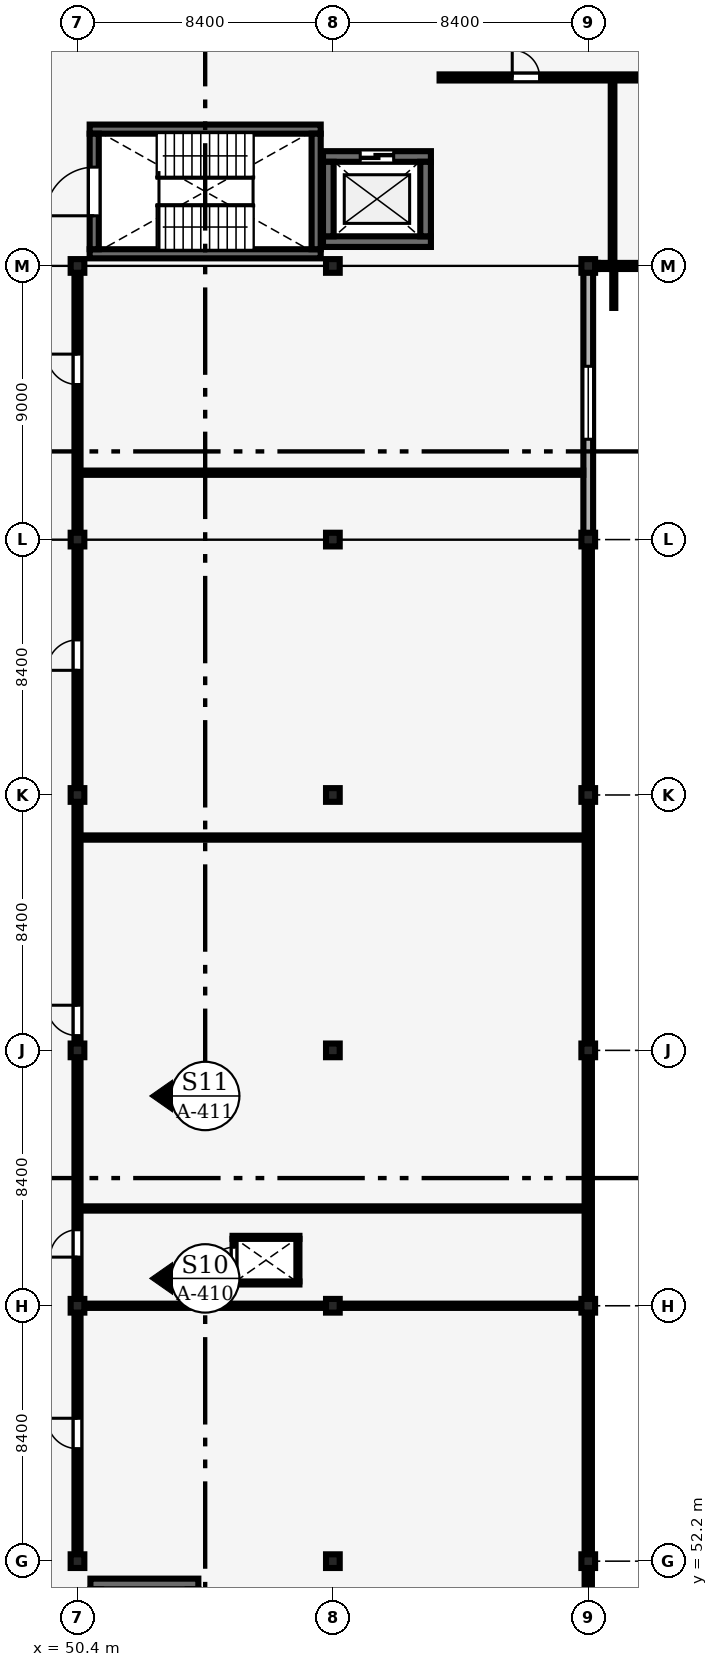
"""IFC4 building model, lengths in metres.
Left out: names, types, materials, properties, quantities, classifications, styles, units other than length and angle.
Written with IfcOpenShell. Run it as: python <this file> out.ifc"""

import sys

from ifc_helpers import new_model, si_unit, direction, frame, frame_2d, origin, origin_2d, place, context, subcontext, project, spatial, rectangle, extrude, element, fill, save


model = new_model("IFC4")
c1 = context("Model", 3, precision=1e-05, world=origin(), true_north=direction((0.0, 1.0)))
c2 = subcontext(c1, "Body", "Model", "MODEL_VIEW")
j1 = project(units=[si_unit("LENGTHUNIT", "METRE"), si_unit("PLANEANGLEUNIT", "RADIAN")], contexts=[c1])
p1 = place(None, origin())
s1 = spatial("IfcSite", under=j1, at=p1, CompositionType="ELEMENT")
p2 = place(p1, origin())
s2 = spatial("IfcBuilding", under=s1, at=p2, CompositionType="ELEMENT")
p3 = place(p2, frame((0.0, 0.0, 17.4)))
s3 = spatial("IfcBuildingStorey", under=s2, at=p3, CompositionType="ELEMENT", Elevation=17.4)
for number, where, z_axis, x_axis in (
    (1, (50.4, 52.2, 0.0), (0.0, 0.0, 1.0), (1.0, 0.0, 0.0)),
    (2, (50.4, 60.6, 0.0), (0.0, 0.0, 1.0), (1.0, 0.0, 0.0)),
    (3, (50.4, 69.0, 0.0), (0.0, 0.0, 1.0), (1.0, 0.0, 0.0)),
    (4, (50.4, 77.4, 0.0), (0.0, 0.0, 1.0), (1.0, 0.0, 0.0)),
    (5, (50.4, 85.8, 0.0), (0.0, 0.0, 1.0), (1.0, 0.0, 0.0)),
    (6, (50.4, 94.8, 0.0), (0.0, 0.0, 1.0), (1.0, 0.0, 0.0)),
    (7, (58.8, 52.2, 0.0), (0.0, 0.0, 1.0), (1.0, 0.0, 0.0)),
    (8, (58.8, 60.6, 0.0), (0.0, 0.0, 1.0), (1.0, 0.0, 0.0)),
    (9, (58.8, 69.0, 0.0), (0.0, 0.0, 1.0), (1.0, 0.0, 0.0)),
    (10, (58.8, 77.4, 0.0), (0.0, 0.0, 1.0), (1.0, 0.0, 0.0)),
    (11, (58.8, 85.8, 0.0), (0.0, 0.0, 1.0), (1.0, 0.0, 0.0)),
    (12, (58.8, 94.8, 0.0), (0.0, 0.0, 1.0), (1.0, 0.0, 0.0)),
    (13, (67.2, 52.2, 0.0), (0.0, 0.0, 1.0), (1.0, 0.0, 0.0)),
    (14, (67.2, 60.6, 0.0), (0.0, 0.0, 1.0), (1.0, 0.0, 0.0)),
    (15, (67.2, 69.0, 0.0), (0.0, 0.0, 1.0), (1.0, 0.0, 0.0)),
    (16, (67.2, 77.4, 0.0), (0.0, 0.0, 1.0), (1.0, 0.0, 0.0)),
    (17, (67.2, 85.8, 0.0), (0.0, 0.0, 1.0), (1.0, 0.0, 0.0)),
    (18, (67.2, 94.8, 0.0), (0.0, 0.0, 1.0), (1.0, 0.0, 0.0)),
):
    element("IfcColumn", number, at=place(p3, frame(where, z_axis=z_axis, x_axis=x_axis)), inside=s3, PredefinedType="COLUMN", context=c2, shape_type="SweptSolid", body=[
        extrude(rectangle(XDim=0.45, YDim=0.45, at=origin_2d()), origin(), (0.0, 0.0, 1.0), 4.2),
    ])
p4 = place(p3, frame((67.2, 86.0, 0.0), z_axis=(0.0, 0.0, 1.0), x_axis=(0.0, 1.0, 0.0)))
e19 = element("IfcWall", 19, at=p4, inside=s3, PredefinedType="SOLIDWALL", context=c2, shape_type="SweptSolid", body=[
    extrude(rectangle(XDim=8.6, YDim=0.32, at=frame_2d((4.3, 0.0))), origin(), (0.0, 0.0, 1.0), 3.43),
])
p5 = place(p4, frame((3.1, 0.0, 0.9)))
e20 = element("IfcOpeningElement", 20, at=p5, cuts=e19, PredefinedType="OPENING", context=c2, shape_type="SweptSolid", body=[
    extrude(rectangle(XDim=2.4, YDim=1.8, at=frame_2d((1.2, 0.9))), frame((0.0, 0.17, 0.0), z_axis=(0.0, -1.0, 0.0), x_axis=(1.0, 0.0, 0.0)), (0.0, 0.0, 1.0), 0.34),
])
for number, where, z_axis, x_axis in (
    (21, (67.2, 44.0, 0.0), (0.0, 0.0, 1.0), (0.0, 1.0, 0.0)),
    (22, (67.2, 52.4, 0.0), (0.0, 0.0, 1.0), (0.0, 1.0, 0.0)),
    (23, (67.2, 60.8, 0.0), (0.0, 0.0, 1.0), (0.0, 1.0, 0.0)),
    (24, (67.2, 69.2, 0.0), (0.0, 0.0, 1.0), (0.0, 1.0, 0.0)),
    (25, (67.2, 77.6, 0.0), (0.0, 0.0, 1.0), (0.0, 1.0, 0.0)),
):
    element("IfcWall", number, at=place(p3, frame(where, z_axis=z_axis, x_axis=x_axis)), inside=s3, PredefinedType="SOLIDWALL", context=c2, shape_type="SweptSolid", body=[
        extrude(rectangle(XDim=8.0, YDim=0.24, at=frame_2d((4.0, 0.0))), origin(), (0.0, 0.0, 1.0), 1.15),
    ])
p6 = place(p3, frame((50.825, 51.45, 0.0), z_axis=(0.0, 0.0, 1.0), x_axis=(1.0, 0.0, 0.0)))
e26 = element("IfcWall", 26, at=p6, inside=s3, PredefinedType="SHEAR", context=c2, shape_type="SweptSolid", body=[
    extrude(rectangle(XDim=3.55, YDim=0.35, at=frame_2d((1.775, 0.0))), origin(), (0.0, 0.0, 1.0), 3.92),
])
for number, where, z_axis, x_axis in (
    (27, (50.8, 95.2, 0.0), (0.0, 0.0, 1.0), (1.0, 0.0, 0.0)),
    (28, (50.8, 99.3, 0.0), (0.0, 0.0, 1.0), (1.0, 0.0, 0.0)),
):
    element("IfcWall", number, at=place(p3, frame(where, z_axis=z_axis, x_axis=x_axis)), inside=s3, PredefinedType="SHEAR", context=c2, shape_type="SweptSolid", body=[
        extrude(rectangle(XDim=7.6, YDim=0.3, at=frame_2d((3.8, 0.0))), origin(), (0.0, 0.0, 1.0), 4.025),
    ])
p7 = place(p3, frame((50.95, 95.35, 0.0), z_axis=(0.0, 0.0, 1.0), x_axis=(0.0, 1.0, 0.0)))
e29 = element("IfcWall", 29, at=p7, inside=s3, PredefinedType="SHEAR", context=c2, shape_type="SweptSolid", body=[
    extrude(rectangle(XDim=3.8, YDim=0.3, at=frame_2d((1.9, 0.0))), origin(), (0.0, 0.0, 1.0), 4.025),
])
p8 = place(p7, frame((1.1, 0.0, 0.0)))
e30 = element("IfcOpeningElement", 30, at=p8, cuts=e29, PredefinedType="OPENING", context=c2, shape_type="SweptSolid", body=[
    extrude(rectangle(XDim=1.6, YDim=2.2, at=frame_2d((0.8, 1.1))), frame((0.0, 0.16, 0.0), z_axis=(0.0, -1.0, 0.0), x_axis=(1.0, 0.0, 0.0)), (0.0, 0.0, 1.0), 0.32),
])
p9 = place(p3, frame((58.25, 95.35, 0.0), z_axis=(0.0, 0.0, 1.0), x_axis=(0.0, 1.0, 0.0)))
e31 = element("IfcWall", 31, at=p9, inside=s3, PredefinedType="SHEAR", context=c2, shape_type="SweptSolid", body=[
    extrude(rectangle(XDim=3.8, YDim=0.3, at=frame_2d((1.9, 0.0))), origin(), (0.0, 0.0, 1.0), 4.025),
])
p10 = place(p3, frame((58.475, 95.6, 0.0), z_axis=(0.0, 0.0, 1.0), x_axis=(1.0, 0.0, 0.0)))
e32 = element("IfcWall", 32, at=p10, inside=s3, PredefinedType="SHEAR", context=c2, shape_type="SweptSolid", body=[
    extrude(rectangle(XDim=3.55, YDim=0.35, at=frame_2d((1.775, 0.0))), origin(), (0.0, 0.0, 1.0), 3.92),
])
p11 = place(p3, frame((58.475, 98.4, 0.0), z_axis=(0.0, 0.0, 1.0), x_axis=(1.0, 0.0, 0.0)))
e33 = element("IfcWall", 33, at=p11, inside=s3, PredefinedType="SHEAR", context=c2, shape_type="SweptSolid", body=[
    extrude(rectangle(XDim=3.55, YDim=0.35, at=frame_2d((1.775, 0.0))), origin(), (0.0, 0.0, 1.0), 3.92),
])
p12 = place(p11, frame((1.225, 0.0, 0.0)))
e34 = element("IfcOpeningElement", 34, at=p12, cuts=e33, PredefinedType="OPENING", context=c2, shape_type="SweptSolid", body=[
    extrude(rectangle(XDim=1.1, YDim=2.2, at=frame_2d((0.55, 1.1))), frame((0.0, 0.185, 0.0), z_axis=(0.0, -1.0, 0.0), x_axis=(1.0, 0.0, 0.0)), (0.0, 0.0, 1.0), 0.37),
])
for number, where, z_axis, x_axis in (
    (35, (58.65, 95.775, 0.0), (0.0, 0.0, 1.0), (0.0, 1.0, 0.0)),
    (36, (61.85, 95.775, 0.0), (0.0, 0.0, 1.0), (0.0, 1.0, 0.0)),
):
    element("IfcWall", number, at=place(p3, frame(where, z_axis=z_axis, x_axis=x_axis)), inside=s3, PredefinedType="SHEAR", context=c2, shape_type="SweptSolid", body=[
        extrude(rectangle(XDim=2.45, YDim=0.35, at=frame_2d((1.225, 0.0))), origin(), (0.0, 0.0, 1.0), 3.92),
    ])
for number, where, z_axis, x_axis in (
    (37, (55.5, 61.35, 0.0), (0.0, 0.0, 1.0), (1.0, 0.0, 0.0)),
    (38, (55.5, 62.85, 0.0), (0.0, 0.0, 1.0), (1.0, 0.0, 0.0)),
):
    element("IfcWall", number, at=place(p3, frame(where, z_axis=z_axis, x_axis=x_axis)), inside=s3, PredefinedType="PARTITIONING", context=c2, shape_type="SweptSolid", body=[
        extrude(rectangle(XDim=2.2, YDim=0.1, at=frame_2d((1.1, 0.0))), origin(), (0.0, 0.0, 1.0), 3.9),
    ])
p13 = place(p3, frame((55.55, 61.4, 0.0), z_axis=(0.0, 0.0, 1.0), x_axis=(0.0, 1.0, 0.0)))
e39 = element("IfcWall", 39, at=p13, inside=s3, PredefinedType="PARTITIONING", context=c2, shape_type="SweptSolid", body=[
    extrude(rectangle(XDim=1.4, YDim=0.1, at=frame_2d((0.7, 0.0))), origin(), (0.0, 0.0, 1.0), 3.9),
])
p14 = place(p13, frame((0.275, 0.0, 0.0)))
e40 = element("IfcOpeningElement", 40, at=p14, cuts=e39, PredefinedType="OPENING", context=c2, shape_type="SweptSolid", body=[
    extrude(rectangle(XDim=0.85, YDim=2.05, at=frame_2d((0.425, 1.025))), frame((0.0, 0.06, 0.0), z_axis=(0.0, -1.0, 0.0), x_axis=(1.0, 0.0, 0.0)), (0.0, 0.0, 1.0), 0.12),
])
p15 = place(p3, frame((57.65, 61.4, 0.0), z_axis=(0.0, 0.0, 1.0), x_axis=(0.0, 1.0, 0.0)))
e41 = element("IfcWall", 41, at=p15, inside=s3, PredefinedType="PARTITIONING", context=c2, shape_type="SweptSolid", body=[
    extrude(rectangle(XDim=1.4, YDim=0.1, at=frame_2d((0.7, 0.0))), origin(), (0.0, 0.0, 1.0), 3.9),
])
p16 = place(p3, frame((50.505, 60.6, 0.0), z_axis=(0.0, 0.0, 1.0), x_axis=(1.0, 0.0, 0.0)))
e42 = element("IfcWall", 42, at=p16, inside=s3, PredefinedType="PARTITIONING", context=c2, shape_type="SweptSolid", body=[
    extrude(rectangle(XDim=8.06, YDim=0.14, at=frame_2d((4.03, 0.0))), origin(), (0.0, 0.0, 1.0), 2.94),
])
p17 = place(p3, frame((59.035, 60.6, 0.0), z_axis=(0.0, 0.0, 1.0), x_axis=(1.0, 0.0, 0.0)))
e43 = element("IfcWall", 43, at=p17, inside=s3, PredefinedType="PARTITIONING", context=c2, shape_type="SweptSolid", body=[
    extrude(rectangle(XDim=8.04, YDim=0.14, at=frame_2d((4.02, 0.0))), origin(), (0.0, 0.0, 1.0), 3.48),
])
p18 = place(p3, frame((50.505, 63.8, 0.0), z_axis=(0.0, 0.0, 1.0), x_axis=(1.0, 0.0, 0.0)))
e44 = element("IfcWall", 44, at=p18, inside=s3, PredefinedType="PARTITIONING", context=c2, shape_type="SweptSolid", body=[
    extrude(rectangle(XDim=16.57, YDim=0.14, at=frame_2d((8.285, 0.0))), origin(), (0.0, 0.0, 1.0), 3.451),
])
p19 = place(p3, frame((50.505, 76.0, 0.0), z_axis=(0.0, 0.0, 1.0), x_axis=(1.0, 0.0, 0.0)))
e45 = element("IfcWall", 45, at=p19, inside=s3, PredefinedType="PARTITIONING", context=c2, shape_type="SweptSolid", body=[
    extrude(rectangle(XDim=16.57, YDim=0.14, at=frame_2d((8.285, 0.0))), origin(), (0.0, 0.0, 1.0), 3.9),
])
p20 = place(p3, frame((50.505, 88.0, 0.0), z_axis=(0.0, 0.0, 1.0), x_axis=(1.0, 0.0, 0.0)))
e46 = element("IfcWall", 46, at=p20, inside=s3, PredefinedType="PARTITIONING", context=c2, shape_type="SweptSolid", body=[
    extrude(rectangle(XDim=16.53, YDim=0.14, at=frame_2d((8.265, 0.0))), origin(), (0.0, 0.0, 1.0), 3.9),
])
p21 = place(p3, frame((50.4, 52.435, 0.0), z_axis=(0.0, 0.0, 1.0), x_axis=(0.0, 1.0, 0.0)))
e47 = element("IfcWall", 47, at=p21, inside=s3, PredefinedType="PARTITIONING", context=c2, shape_type="SweptSolid", body=[
    extrude(rectangle(XDim=7.93, YDim=0.2, at=frame_2d((3.965, 0.0))), origin(), (0.0, 0.0, 1.0), 3.14),
])
p22 = place(p21, frame((3.465, 0.0, 0.0)))
e48 = element("IfcOpeningElement", 48, at=p22, cuts=e47, PredefinedType="OPENING", context=c2, shape_type="SweptSolid", body=[
    extrude(rectangle(XDim=1.0, YDim=2.15, at=frame_2d((0.5, 1.075))), frame((0.0, 0.11, 0.0), z_axis=(0.0, -1.0, 0.0), x_axis=(1.0, 0.0, 0.0)), (0.0, 0.0, 1.0), 0.22),
])
p23 = place(p3, frame((50.4, 60.835, 0.0), z_axis=(0.0, 0.0, 1.0), x_axis=(0.0, 1.0, 0.0)))
e49 = element("IfcWall", 49, at=p23, inside=s3, PredefinedType="PARTITIONING", context=c2, shape_type="SweptSolid", body=[
    extrude(rectangle(XDim=7.93, YDim=0.2, at=frame_2d((3.965, 0.0))), origin(), (0.0, 0.0, 1.0), 3.09),
])
p24 = place(p23, frame((1.365, 0.0, 0.0)))
e50 = element("IfcOpeningElement", 50, at=p24, cuts=e49, PredefinedType="OPENING", context=c2, shape_type="SweptSolid", body=[
    extrude(rectangle(XDim=0.9, YDim=2.1, at=frame_2d((0.45, 1.05))), frame((0.0, 0.11, 0.0), z_axis=(0.0, -1.0, 0.0), x_axis=(1.0, 0.0, 0.0)), (0.0, 0.0, 1.0), 0.22),
])
p25 = place(p3, frame((50.4, 69.235, 0.0), z_axis=(0.0, 0.0, 1.0), x_axis=(0.0, 1.0, 0.0)))
e51 = element("IfcWall", 51, at=p25, inside=s3, PredefinedType="PARTITIONING", context=c2, shape_type="SweptSolid", body=[
    extrude(rectangle(XDim=7.93, YDim=0.2, at=frame_2d((3.965, 0.0))), origin(), (0.0, 0.0, 1.0), 3.09),
])
p26 = place(p25, frame((0.25, 0.0, 0.0)))
e52 = element("IfcOpeningElement", 52, at=p26, cuts=e51, PredefinedType="OPENING", context=c2, shape_type="SweptSolid", body=[
    extrude(rectangle(XDim=1.0, YDim=2.15, at=frame_2d((0.5, 1.075))), frame((0.0, 0.11, 0.0), z_axis=(0.0, -1.0, 0.0), x_axis=(1.0, 0.0, 0.0)), (0.0, 0.0, 1.0), 0.22),
])
p27 = place(p3, frame((50.4, 77.635, 0.0), z_axis=(0.0, 0.0, 1.0), x_axis=(0.0, 1.0, 0.0)))
e53 = element("IfcWall", 53, at=p27, inside=s3, PredefinedType="PARTITIONING", context=c2, shape_type="SweptSolid", body=[
    extrude(rectangle(XDim=7.93, YDim=0.2, at=frame_2d((3.965, 0.0))), origin(), (0.0, 0.0, 1.0), 3.04),
])
p28 = place(p27, frame((3.865, 0.0, 0.0)))
e54 = element("IfcOpeningElement", 54, at=p28, cuts=e53, PredefinedType="OPENING", context=c2, shape_type="SweptSolid", body=[
    extrude(rectangle(XDim=1.0, YDim=2.15, at=frame_2d((0.5, 1.075))), frame((0.0, 0.11, 0.0), z_axis=(0.0, -1.0, 0.0), x_axis=(1.0, 0.0, 0.0)), (0.0, 0.0, 1.0), 0.22),
])
p29 = place(p3, frame((50.4, 86.035, 0.0), z_axis=(0.0, 0.0, 1.0), x_axis=(0.0, 1.0, 0.0)))
e55 = element("IfcWall", 55, at=p29, inside=s3, PredefinedType="PARTITIONING", context=c2, shape_type="SweptSolid", body=[
    extrude(rectangle(XDim=8.53, YDim=0.2, at=frame_2d((4.265, 0.0))), origin(), (0.0, 0.0, 1.0), 2.99),
])
p30 = place(p29, frame((4.865, 0.0, 0.0)))
e56 = element("IfcOpeningElement", 56, at=p30, cuts=e55, PredefinedType="OPENING", context=c2, shape_type="SweptSolid", body=[
    extrude(rectangle(XDim=1.0, YDim=2.15, at=frame_2d((0.5, 1.075))), frame((0.0, 0.11, 0.0), z_axis=(0.0, -1.0, 0.0), x_axis=(1.0, 0.0, 0.0)), (0.0, 0.0, 1.0), 0.22),
])
p31 = place(p3, frame((68.0, 94.905, 0.0), z_axis=(0.0, 0.0, 1.0), x_axis=(0.0, 1.0, 0.0)))
e57 = element("IfcWall", 57, at=p31, inside=s3, PredefinedType="PARTITIONING", context=c2, shape_type="SweptSolid", body=[
    extrude(rectangle(XDim=5.99, YDim=0.12, at=frame_2d((2.995, 0.0))), origin(), (0.0, 0.0, 1.0), 3.9),
])
p32 = place(p3, frame((62.31, 101.0, 0.0), z_axis=(0.0, 0.0, 1.0), x_axis=(1.0, 0.0, 0.0)))
e58 = element("IfcWall", 58, at=p32, inside=s3, PredefinedType="PARTITIONING", context=c2, shape_type="SweptSolid", body=[
    extrude(rectangle(XDim=21.525, YDim=0.2, at=frame_2d((10.762, 0.0))), origin(), (0.0, 0.0, 1.0), 3.451),
])
p33 = place(p32, frame((2.39, 0.0, 0.0)))
e59 = element("IfcOpeningElement", 59, at=p33, cuts=e58, PredefinedType="OPENING", context=c2, shape_type="SweptSolid", body=[
    extrude(rectangle(XDim=0.9, YDim=2.1, at=frame_2d((0.45, 1.05))), frame((0.0, 0.11, 0.0), z_axis=(0.0, -1.0, 0.0), x_axis=(1.0, 0.0, 0.0)), (0.0, 0.0, 1.0), 0.22),
])
p34 = place(p32, frame((7.64, 0.0, 0.0)))
e60 = element("IfcOpeningElement", 60, at=p34, cuts=e58, PredefinedType="OPENING", context=c2, shape_type="SweptSolid", body=[
    extrude(rectangle(XDim=0.9, YDim=2.1, at=frame_2d((0.45, 1.05))), frame((0.0, 0.11, 0.0), z_axis=(0.0, -1.0, 0.0), x_axis=(1.0, 0.0, 0.0)), (0.0, 0.0, 1.0), 0.22),
])
p35 = place(p5, origin())
e61 = element("IfcWindow", 61, at=p35, inside=s3, PartitioningType="SINGLE_PANEL", PredefinedType="WINDOW", context=c2, shape_type="SweptSolid", body=[
    extrude(rectangle(XDim=2.4, YDim=1.8, at=frame_2d((1.2, 0.9))), frame((0.0, 0.03, 0.0), z_axis=(0.0, -1.0, 0.0), x_axis=(1.0, 0.0, 0.0)), (0.0, 0.0, 1.0), 0.06),
])
fill(e20, e61)
p36 = place(p8, origin())
e62 = element("IfcDoor", 62, at=p36, inside=s3, OperationType="DOUBLE_DOOR_SINGLE_SWING", PredefinedType="DOOR", context=c2, shape_type="SweptSolid", body=[
    extrude(rectangle(XDim=1.6, YDim=2.2, at=frame_2d((0.8, 1.1))), frame((0.0, 0.025, 0.0), z_axis=(0.0, -1.0, 0.0), x_axis=(1.0, 0.0, 0.0)), (0.0, 0.0, 1.0), 0.05),
])
fill(e30, e62)
p37 = place(p12, origin())
e63 = element("IfcDoor", 63, at=p37, inside=s3, OperationType="DOUBLE_DOOR_SLIDING", PredefinedType="DOOR", context=c2, shape_type="SweptSolid", body=[
    extrude(rectangle(XDim=1.1, YDim=2.2, at=frame_2d((0.55, 1.1))), frame((0.0, 0.025, 0.0), z_axis=(0.0, -1.0, 0.0), x_axis=(1.0, 0.0, 0.0)), (0.0, 0.0, 1.0), 0.05),
])
fill(e34, e63)
p38 = place(p14, origin())
e64 = element("IfcDoor", 64, at=p38, inside=s3, OperationType="SINGLE_SWING_LEFT", PredefinedType="DOOR", context=c2, shape_type="SweptSolid", body=[
    extrude(rectangle(XDim=0.85, YDim=2.05, at=frame_2d((0.425, 1.025))), frame((0.0, 0.025, 0.0), z_axis=(0.0, -1.0, 0.0), x_axis=(1.0, 0.0, 0.0)), (0.0, 0.0, 1.0), 0.05),
])
fill(e40, e64)
p39 = place(p22, origin())
e65 = element("IfcDoor", 65, at=p39, inside=s3, OperationType="SINGLE_SWING_RIGHT", PredefinedType="DOOR", context=c2, shape_type="SweptSolid", body=[
    extrude(rectangle(XDim=1.0, YDim=2.15, at=frame_2d((0.5, 1.075))), frame((0.0, 0.025, 0.0), z_axis=(0.0, -1.0, 0.0), x_axis=(1.0, 0.0, 0.0)), (0.0, 0.0, 1.0), 0.05),
])
fill(e48, e65)
p40 = place(p24, origin())
e66 = element("IfcDoor", 66, at=p40, inside=s3, OperationType="SINGLE_SWING_LEFT", PredefinedType="DOOR", context=c2, shape_type="SweptSolid", body=[
    extrude(rectangle(XDim=0.9, YDim=2.1, at=frame_2d((0.45, 1.05))), frame((0.0, 0.025, 0.0), z_axis=(0.0, -1.0, 0.0), x_axis=(1.0, 0.0, 0.0)), (0.0, 0.0, 1.0), 0.05),
])
fill(e50, e66)
p41 = place(p26, origin())
e67 = element("IfcDoor", 67, at=p41, inside=s3, OperationType="SINGLE_SWING_RIGHT", PredefinedType="DOOR", context=c2, shape_type="SweptSolid", body=[
    extrude(rectangle(XDim=1.0, YDim=2.15, at=frame_2d((0.5, 1.075))), frame((0.0, 0.025, 0.0), z_axis=(0.0, -1.0, 0.0), x_axis=(1.0, 0.0, 0.0)), (0.0, 0.0, 1.0), 0.05),
])
fill(e52, e67)
p42 = place(p28, origin())
e68 = element("IfcDoor", 68, at=p42, inside=s3, OperationType="SINGLE_SWING_LEFT", PredefinedType="DOOR", context=c2, shape_type="SweptSolid", body=[
    extrude(rectangle(XDim=1.0, YDim=2.15, at=frame_2d((0.5, 1.075))), frame((0.0, 0.025, 0.0), z_axis=(0.0, -1.0, 0.0), x_axis=(1.0, 0.0, 0.0)), (0.0, 0.0, 1.0), 0.05),
])
fill(e54, e68)
p43 = place(p30, origin())
e69 = element("IfcDoor", 69, at=p43, inside=s3, OperationType="SINGLE_SWING_RIGHT", PredefinedType="DOOR", context=c2, shape_type="SweptSolid", body=[
    extrude(rectangle(XDim=1.0, YDim=2.15, at=frame_2d((0.5, 1.075))), frame((0.0, 0.025, 0.0), z_axis=(0.0, -1.0, 0.0), x_axis=(1.0, 0.0, 0.0)), (0.0, 0.0, 1.0), 0.05),
])
fill(e56, e69)
p44 = place(p33, origin())
e70 = element("IfcDoor", 70, at=p44, inside=s3, OperationType="SINGLE_SWING_LEFT", PredefinedType="DOOR", context=c2, shape_type="SweptSolid", body=[
    extrude(rectangle(XDim=0.9, YDim=2.1, at=frame_2d((0.45, 1.05))), frame((0.0, 0.025, 0.0), z_axis=(0.0, -1.0, 0.0), x_axis=(1.0, 0.0, 0.0)), (0.0, 0.0, 1.0), 0.05),
])
fill(e59, e70)
save(model, sys.argv[1])
